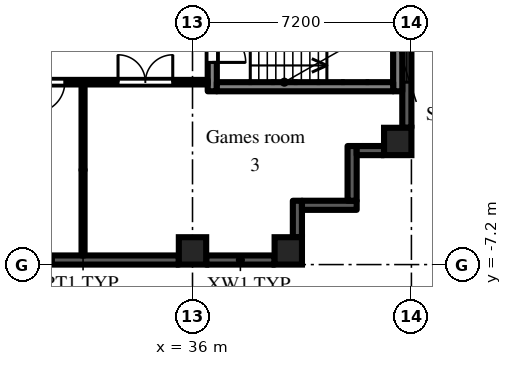
"""IFC4 building model, lengths in metres.
Left out: names, types, materials, properties, quantities, classifications, styles, units other than length and angle.
Written with IfcOpenShell. Run it as: python <this file> out.ifc"""

import sys

from ifc_helpers import new_model, si_unit, direction, frame, frame_2d, origin, origin_2d, place, context, subcontext, project, spatial, rectangle, extrude, element, fill, save


model = new_model("IFC4")
c1 = context("Model", 3, precision=1e-05, world=origin(), true_north=direction((0.0, 1.0)))
c2 = subcontext(c1, "Body", "Model", "MODEL_VIEW")
j1 = project(units=[si_unit("LENGTHUNIT", "METRE"), si_unit("PLANEANGLEUNIT", "RADIAN")], contexts=[c1])
p1 = place(None, origin())
s1 = spatial("IfcSite", under=j1, at=p1, CompositionType="ELEMENT")
p2 = place(p1, origin())
s2 = spatial("IfcBuilding", under=s1, at=p2, CompositionType="ELEMENT")
p3 = place(p2, frame((0.0, 0.0, 53.7)))
s3 = spatial("IfcBuildingStorey", under=s2, at=p3, CompositionType="ELEMENT", Elevation=53.7)
for number, where, z_axis, x_axis in (
    (1, (36.0, -6.75, 0.0), (0.0, 0.0, 1.0), (1.0, 0.0, 0.0)),
    (2, (39.15, -6.75, 0.0), (0.0, 0.0, 1.0), (1.0, 0.0, 0.0)),
    (3, (42.75, -3.15, 0.0), (0.0, 0.0, 1.0), (1.0, 0.0, 0.0)),
):
    element("IfcColumn", number, at=place(p3, frame(where, z_axis=z_axis, x_axis=x_axis)), inside=s3, PredefinedType="COLUMN", context=c2, shape_type="SweptSolid", body=[
        extrude(rectangle(XDim=0.9, YDim=0.9, at=origin_2d()), origin(), (0.0, 0.0, 1.0), 3.0),
    ])
p4 = place(p3, frame((29.25, -7.05, 0.0), z_axis=(0.0, 0.0, 1.0), x_axis=(1.0, 0.0, 0.0)))
e4 = element("IfcWall", 4, at=p4, inside=s3, PredefinedType="SOLIDWALL", context=c2, shape_type="SweptSolid", body=[
    extrude(rectangle(XDim=6.3, YDim=0.3, at=frame_2d((3.15, 0.0))), origin(), (0.0, 0.0, 1.0), 2.1),
])
p5 = place(p4, frame((0.975, 0.0, 0.2)))
e5 = element("IfcOpeningElement", 5, at=p5, cuts=e4, PredefinedType="OPENING", context=c2, shape_type="SweptSolid", body=[
    extrude(rectangle(XDim=1.2, YDim=1.85, at=frame_2d((0.6, 0.925))), frame((0.0, 0.16, 0.0), z_axis=(0.0, -1.0, 0.0), x_axis=(1.0, 0.0, 0.0)), (0.0, 0.0, 1.0), 0.32),
])
p6 = place(p3, frame((36.45, -7.05, 0.0), z_axis=(0.0, 0.0, 1.0), x_axis=(1.0, 0.0, 0.0)))
e6 = element("IfcWall", 6, at=p6, inside=s3, PredefinedType="SOLIDWALL", context=c2, shape_type="SweptSolid", body=[
    extrude(rectangle(XDim=2.25, YDim=0.3, at=frame_2d((1.125, 0.0))), origin(), (0.0, 0.0, 1.0), 2.1),
])
p7 = place(p3, frame((39.45, -6.3, 0.0), z_axis=(0.0, 0.0, 1.0), x_axis=(0.0, 1.0, 0.0)))
e7 = element("IfcWall", 7, at=p7, inside=s3, PredefinedType="SOLIDWALL", context=c2, shape_type="SweptSolid", body=[
    extrude(rectangle(XDim=1.2, YDim=0.3, at=frame_2d((0.6, 0.0))), origin(), (0.0, 0.0, 1.0), 2.575),
])
p8 = place(p3, frame((39.6, -5.25, 0.0), z_axis=(0.0, 0.0, 1.0), x_axis=(1.0, 0.0, 0.0)))
e8 = element("IfcWall", 8, at=p8, inside=s3, PredefinedType="SOLIDWALL", context=c2, shape_type="SweptSolid", body=[
    extrude(rectangle(XDim=1.8, YDim=0.3, at=frame_2d((0.9, 0.0))), origin(), (0.0, 0.0, 1.0), 2.575),
])
p9 = place(p3, frame((41.25, -5.1, 0.0), z_axis=(0.0, 0.0, 1.0), x_axis=(0.0, 1.0, 0.0)))
e9 = element("IfcWall", 9, at=p9, inside=s3, PredefinedType="SOLIDWALL", context=c2, shape_type="SweptSolid", body=[
    extrude(rectangle(XDim=1.8, YDim=0.3, at=frame_2d((0.9, 0.0))), origin(), (0.0, 0.0, 1.0), 2.575),
])
p10 = place(p3, frame((41.4, -3.45, 0.0), z_axis=(0.0, 0.0, 1.0), x_axis=(1.0, 0.0, 0.0)))
e10 = element("IfcWall", 10, at=p10, inside=s3, PredefinedType="SOLIDWALL", context=c2, shape_type="SweptSolid", body=[
    extrude(rectangle(XDim=0.9, YDim=0.3, at=frame_2d((0.45, 0.0))), origin(), (0.0, 0.0, 1.0), 2.575),
])
p11 = place(p3, frame((43.05, -2.7, 0.0), z_axis=(0.0, 0.0, 1.0), x_axis=(0.0, 1.0, 0.0)))
e11 = element("IfcWall", 11, at=p11, inside=s3, PredefinedType="SOLIDWALL", context=c2, shape_type="SweptSolid", body=[
    extrude(rectangle(XDim=5.4, YDim=0.3, at=frame_2d((2.7, 0.0))), origin(), (0.0, 0.0, 1.0), 2.1),
])
p12 = place(p11, frame((1.5, 0.0, 0.2)))
e12 = element("IfcOpeningElement", 12, at=p12, cuts=e11, PredefinedType="OPENING", context=c2, shape_type="SweptSolid", body=[
    extrude(rectangle(XDim=2.4, YDim=1.85, at=frame_2d((1.2, 0.925))), frame((0.0, 0.16, 0.0), z_axis=(0.0, -1.0, 0.0), x_axis=(1.0, 0.0, 0.0)), (0.0, 0.0, 1.0), 0.32),
])
p13 = place(p11, frame((4.05, 0.0, 0.2)))
e13 = element("IfcOpeningElement", 13, at=p13, cuts=e11, PredefinedType="OPENING", context=c2, shape_type="SweptSolid", body=[
    extrude(rectangle(XDim=1.2, YDim=1.85, at=frame_2d((0.6, 0.925))), frame((0.0, 0.16, 0.0), z_axis=(0.0, -1.0, 0.0), x_axis=(1.0, 0.0, 0.0)), (0.0, 0.0, 1.0), 0.32),
])
p14 = place(p3, frame((36.65, -1.5, 0.0), z_axis=(0.0, 0.0, 1.0), x_axis=(0.0, 1.0, 0.0)))
e14 = element("IfcWall", 14, at=p14, inside=s3, PredefinedType="SHEAR", context=c2, shape_type="SweptSolid", body=[
    extrude(rectangle(XDim=3.0, YDim=0.3, at=frame_2d((1.5, 0.0))), origin(), (0.0, 0.0, 1.0), 2.575),
])
p15 = place(p14, frame((0.95, 0.0, 0.0)))
e15 = element("IfcOpeningElement", 15, at=p15, cuts=e14, PredefinedType="OPENING", context=c2, shape_type="SweptSolid", body=[
    extrude(rectangle(XDim=1.1, YDim=2.1, at=frame_2d((0.55, 1.05))), frame((0.0, 0.16, 0.0), z_axis=(0.0, -1.0, 0.0), x_axis=(1.0, 0.0, 0.0)), (0.0, 0.0, 1.0), 0.32),
])
p16 = place(p3, frame((42.75, -1.5, 0.0), z_axis=(0.0, 0.0, 1.0), x_axis=(0.0, 1.0, 0.0)))
e16 = element("IfcWall", 16, at=p16, inside=s3, PredefinedType="SHEAR", context=c2, shape_type="SweptSolid", body=[
    extrude(rectangle(XDim=3.0, YDim=0.3, at=frame_2d((1.5, 0.0))), origin(), (0.0, 0.0, 1.0), 2.575),
])
p17 = place(p3, frame((36.8, -1.35, 0.0), z_axis=(0.0, 0.0, 1.0), x_axis=(1.0, 0.0, 0.0)))
e17 = element("IfcWall", 17, at=p17, inside=s3, PredefinedType="SHEAR", context=c2, shape_type="SweptSolid", body=[
    extrude(rectangle(XDim=5.8, YDim=0.3, at=frame_2d((2.9, 0.0))), origin(), (0.0, 0.0, 1.0), 2.575),
])
p18 = place(p3, frame((21.6, -1.2, 0.0), z_axis=(0.0, 0.0, 1.0), x_axis=(1.0, 0.0, 0.0)))
e18 = element("IfcWall", 18, at=p18, inside=s3, PredefinedType="PARTITIONING", context=c2, shape_type="SweptSolid", body=[
    extrude(rectangle(XDim=14.9, YDim=0.15, at=frame_2d((7.45, 0.0))), origin(), (0.0, 0.0, 1.0), 2.575),
])
p19 = place(p18, frame((3.8, 0.0, 0.0)))
e19 = element("IfcOpeningElement", 19, at=p19, cuts=e18, PredefinedType="OPENING", context=c2, shape_type="SweptSolid", body=[
    extrude(rectangle(XDim=1.0, YDim=2.1, at=frame_2d((0.5, 1.05))), frame((0.0, 0.085, 0.0), z_axis=(0.0, -1.0, 0.0), x_axis=(1.0, 0.0, 0.0)), (0.0, 0.0, 1.0), 0.17),
])
p20 = place(p18, frame((9.2, 0.0, 0.0)))
e20 = element("IfcOpeningElement", 20, at=p20, cuts=e18, PredefinedType="OPENING", context=c2, shape_type="SweptSolid", body=[
    extrude(rectangle(XDim=1.0, YDim=2.1, at=frame_2d((0.5, 1.05))), frame((0.0, 0.085, 0.0), z_axis=(0.0, -1.0, 0.0), x_axis=(1.0, 0.0, 0.0)), (0.0, 0.0, 1.0), 0.17),
])
p21 = place(p18, frame((11.95, 0.0, 0.0)))
e21 = element("IfcOpeningElement", 21, at=p21, cuts=e18, PredefinedType="OPENING", context=c2, shape_type="SweptSolid", body=[
    extrude(rectangle(XDim=1.8, YDim=2.1, at=frame_2d((0.9, 1.05))), frame((0.0, 0.085, 0.0), z_axis=(0.0, -1.0, 0.0), x_axis=(1.0, 0.0, 0.0)), (0.0, 0.0, 1.0), 0.17),
])
p22 = place(p3, frame((32.4, -6.9, 0.0), z_axis=(0.0, 0.0, 1.0), x_axis=(0.0, 1.0, 0.0)))
e22 = element("IfcWall", 22, at=p22, inside=s3, PredefinedType="PARTITIONING", context=c2, shape_type="SweptSolid", body=[
    extrude(rectangle(XDim=5.625, YDim=0.1, at=frame_2d((2.812, 0.0))), origin(), (0.0, 0.0, 1.0), 2.575),
])
p23 = place(p5, origin())
e23 = element("IfcWindow", 23, at=p23, inside=s3, PartitioningType="SINGLE_PANEL", PredefinedType="WINDOW", context=c2, shape_type="SweptSolid", body=[
    extrude(rectangle(XDim=1.2, YDim=1.85, at=frame_2d((0.6, 0.925))), frame((0.0, 0.03, 0.0), z_axis=(0.0, -1.0, 0.0), x_axis=(1.0, 0.0, 0.0)), (0.0, 0.0, 1.0), 0.06),
])
fill(e5, e23)
p24 = place(p12, origin())
e24 = element("IfcWindow", 24, at=p24, inside=s3, PartitioningType="SINGLE_PANEL", PredefinedType="WINDOW", context=c2, shape_type="SweptSolid", body=[
    extrude(rectangle(XDim=2.4, YDim=1.85, at=frame_2d((1.2, 0.925))), frame((0.0, 0.03, 0.0), z_axis=(0.0, -1.0, 0.0), x_axis=(1.0, 0.0, 0.0)), (0.0, 0.0, 1.0), 0.06),
])
fill(e12, e24)
p25 = place(p15, frame((1.1, 0.0, 0.0), z_axis=(0.0, 0.0, 1.0), x_axis=(-1.0, 0.0, 0.0)))
e25 = element("IfcDoor", 25, at=p25, inside=s3, OperationType="SINGLE_SWING_RIGHT", PredefinedType="DOOR", context=c2, shape_type="SweptSolid", body=[
    extrude(rectangle(XDim=1.1, YDim=2.1, at=frame_2d((0.55, 1.05))), frame((0.0, 0.025, 0.0), z_axis=(0.0, -1.0, 0.0), x_axis=(1.0, 0.0, 0.0)), (0.0, 0.0, 1.0), 0.05),
])
fill(e15, e25)
p26 = place(p20, frame((1.0, 0.0, 0.0), z_axis=(0.0, 0.0, 1.0), x_axis=(-1.0, 0.0, 0.0)))
e26 = element("IfcDoor", 26, at=p26, inside=s3, OperationType="SINGLE_SWING_RIGHT", PredefinedType="DOOR", context=c2, shape_type="SweptSolid", body=[
    extrude(rectangle(XDim=1.0, YDim=2.1, at=frame_2d((0.5, 1.05))), frame((0.0, 0.025, 0.0), z_axis=(0.0, -1.0, 0.0), x_axis=(1.0, 0.0, 0.0)), (0.0, 0.0, 1.0), 0.05),
])
fill(e20, e26)
p27 = place(p21, origin())
e27 = element("IfcDoor", 27, at=p27, inside=s3, OperationType="DOUBLE_DOOR_DOUBLE_SWING", PredefinedType="DOOR", context=c2, shape_type="SweptSolid", body=[
    extrude(rectangle(XDim=1.8, YDim=2.1, at=frame_2d((0.9, 1.05))), frame((0.0, 0.025, 0.0), z_axis=(0.0, -1.0, 0.0), x_axis=(1.0, 0.0, 0.0)), (0.0, 0.0, 1.0), 0.05),
])
fill(e21, e27)
save(model, sys.argv[1])
